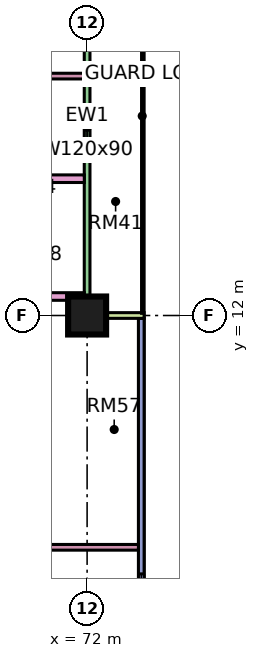
"""IFC4 building model, lengths in metres.
Left out: names, types, materials, properties, quantities, classifications, styles, units other than length and angle.
Written with IfcOpenShell. Run it as: python <this file> out.ifc"""

import sys

from ifc_helpers import new_model, si_unit, direction, frame, frame_2d, origin, origin_2d, place, context, subcontext, project, spatial, rectangle, extrude, element, fill, save


model = new_model("IFC4")
c1 = context("Model", 3, precision=1e-05, world=origin(), true_north=direction((0.0, 1.0)))
c2 = subcontext(c1, "Body", "Model", "MODEL_VIEW")
j1 = project(units=[si_unit("LENGTHUNIT", "METRE"), si_unit("PLANEANGLEUNIT", "RADIAN")], contexts=[c1])
p1 = place(None, origin())
s1 = spatial("IfcSite", under=j1, at=p1, CompositionType="ELEMENT")
p2 = place(p1, origin())
s2 = spatial("IfcBuilding", under=s1, at=p2, CompositionType="ELEMENT")
p3 = place(p2, frame((0.0, 0.0, 129.4)))
s3 = spatial("IfcBuildingStorey", under=s2, at=p3, CompositionType="ELEMENT", Elevation=129.4)
p4 = place(p3, frame((72.0, 12.0, 0.0), z_axis=(0.0, 0.0, 1.0), x_axis=(1.0, 0.0, 0.0)))
e1 = element("IfcColumn", 1, at=p4, inside=s3, PredefinedType="COLUMN", context=c2, shape_type="SweptSolid", body=[
    extrude(rectangle(XDim=1.0, YDim=1.0, at=origin_2d()), origin(), (0.0, 0.0, 1.0), 3.75),
])
p5 = place(p3, frame((73.425, 1.5, 0.0), z_axis=(0.0, 0.0, 1.0), x_axis=(0.0, 1.0, 0.0)))
e2 = element("IfcWall", 2, at=p5, inside=s3, PredefinedType="SOLIDWALL", context=c2, shape_type="SweptSolid", body=[
    extrude(rectangle(XDim=10.425, YDim=0.15, at=frame_2d((5.212, 0.0))), origin(), (0.0, 0.0, 1.0), 3.35),
])
p6 = place(p5, frame((0.7, 0.0, 0.45)))
e3 = element("IfcOpeningElement", 3, at=p6, cuts=e2, PredefinedType="OPENING", context=c2, shape_type="SweptSolid", body=[
    extrude(rectangle(XDim=3.0, YDim=2.4, at=frame_2d((1.5, 1.2))), frame((0.0, 0.085, 0.0), z_axis=(0.0, -1.0, 0.0), x_axis=(1.0, 0.0, 0.0)), (0.0, 0.0, 1.0), 0.17),
])
p7 = place(p3, frame((72.0, 12.075, 0.0), z_axis=(0.0, 0.0, 1.0), x_axis=(0.0, 1.0, 0.0)))
e4 = element("IfcWall", 4, at=p7, inside=s3, PredefinedType="SOLIDWALL", context=c2, shape_type="SweptSolid", body=[
    extrude(rectangle(XDim=10.35, YDim=0.15, at=frame_2d((5.175, 0.0))), origin(), (0.0, 0.0, 1.0), 3.35),
])
p8 = place(p7, frame((4.275, 0.0, 1.7)))
e5 = element("IfcOpeningElement", 5, at=p8, cuts=e4, PredefinedType="OPENING", context=c2, shape_type="SweptSolid", body=[
    extrude(rectangle(XDim=1.2, YDim=0.9, at=frame_2d((0.6, 0.45))), frame((0.0, 0.085, 0.0), z_axis=(0.0, -1.0, 0.0), x_axis=(1.0, 0.0, 0.0)), (0.0, 0.0, 1.0), 0.17),
])
p9 = place(p7, frame((7.988, 0.0, 0.45)))
e6 = element("IfcOpeningElement", 6, at=p9, cuts=e4, PredefinedType="OPENING", context=c2, shape_type="SweptSolid", body=[
    extrude(rectangle(XDim=1.8, YDim=2.4, at=frame_2d((0.9, 1.2))), frame((0.0, 0.085, 0.0), z_axis=(0.0, -1.0, 0.0), x_axis=(1.0, 0.0, 0.0)), (0.0, 0.0, 1.0), 0.17),
])
p10 = place(p3, frame((73.5, 12.0, 0.0), z_axis=(0.0, 0.0, 1.0), x_axis=(-1.0, 0.0, 0.0)))
e7 = element("IfcWall", 7, at=p10, inside=s3, PredefinedType="SOLIDWALL", context=c2, shape_type="SweptSolid", body=[
    extrude(rectangle(XDim=1.5, YDim=0.15, at=frame_2d((0.75, 0.0))), origin(), (0.0, 0.0, 1.0), 3.35),
])
p11 = place(p3, frame((40.65, 12.5, 0.0), z_axis=(0.0, 0.0, 1.0), x_axis=(1.0, 0.0, 0.0)))
e8 = element("IfcWall", 8, at=p11, inside=s3, PredefinedType="PARTITIONING", context=c2, shape_type="SweptSolid", body=[
    extrude(rectangle(XDim=31.276, YDim=0.2, at=frame_2d((15.638, 0.0))), origin(), (0.0, 0.0, 1.0), 3.35),
])
p12 = place(p11, frame((29.1, 0.0, 0.0)))
e9 = element("IfcOpeningElement", 9, at=p12, cuts=e8, PredefinedType="OPENING", context=c2, shape_type="SweptSolid", body=[
    extrude(rectangle(XDim=1.0, YDim=2.1, at=frame_2d((0.5, 1.05))), frame((0.0, 0.11, 0.0), z_axis=(0.0, -1.0, 0.0), x_axis=(1.0, 0.0, 0.0)), (0.0, 0.0, 1.0), 0.22),
])
p13 = place(p11, frame((1.05, 0.0, 0.0)))
e10 = element("IfcOpeningElement", 10, at=p13, cuts=e8, PredefinedType="OPENING", context=c2, shape_type="SweptSolid", body=[
    extrude(rectangle(XDim=1.0, YDim=2.1, at=frame_2d((0.5, 1.05))), frame((0.0, 0.11, 0.0), z_axis=(0.0, -1.0, 0.0), x_axis=(1.0, 0.0, 0.0)), (0.0, 0.0, 1.0), 0.22),
])
p14 = place(p3, frame((48.1, 5.9, 0.0), z_axis=(0.0, 0.0, 1.0), x_axis=(1.0, 0.0, 0.0)))
e11 = element("IfcWall", 11, at=p14, inside=s3, PredefinedType="PARTITIONING", context=c2, shape_type="SweptSolid", body=[
    extrude(rectangle(XDim=25.25, YDim=0.15, at=frame_2d((12.625, 0.0))), origin(), (0.0, 0.0, 1.0), 3.35),
])
p15 = place(p14, frame((6.95, 0.0, 0.0)))
e12 = element("IfcOpeningElement", 12, at=p15, cuts=e11, PredefinedType="OPENING", context=c2, shape_type="SweptSolid", body=[
    extrude(rectangle(XDim=0.9, YDim=2.1, at=frame_2d((0.45, 1.05))), frame((0.0, 0.085, 0.0), z_axis=(0.0, -1.0, 0.0), x_axis=(1.0, 0.0, 0.0)), (0.0, 0.0, 1.0), 0.17),
])
p16 = place(p14, frame((9.95, 0.0, 0.0)))
e13 = element("IfcOpeningElement", 13, at=p16, cuts=e11, PredefinedType="OPENING", context=c2, shape_type="SweptSolid", body=[
    extrude(rectangle(XDim=0.9, YDim=2.1, at=frame_2d((0.45, 1.05))), frame((0.0, 0.085, 0.0), z_axis=(0.0, -1.0, 0.0), x_axis=(1.0, 0.0, 0.0)), (0.0, 0.0, 1.0), 0.17),
])
p17 = place(p14, frame((15.95, 0.0, 0.0)))
e14 = element("IfcOpeningElement", 14, at=p17, cuts=e11, PredefinedType="OPENING", context=c2, shape_type="SweptSolid", body=[
    extrude(rectangle(XDim=0.9, YDim=2.1, at=frame_2d((0.45, 1.05))), frame((0.0, 0.085, 0.0), z_axis=(0.0, -1.0, 0.0), x_axis=(1.0, 0.0, 0.0)), (0.0, 0.0, 1.0), 0.17),
])
p18 = place(p14, frame((20.45, 0.0, 0.0)))
e15 = element("IfcOpeningElement", 15, at=p18, cuts=e11, PredefinedType="OPENING", context=c2, shape_type="SweptSolid", body=[
    extrude(rectangle(XDim=0.9, YDim=2.1, at=frame_2d((0.45, 1.05))), frame((0.0, 0.085, 0.0), z_axis=(0.0, -1.0, 0.0), x_axis=(1.0, 0.0, 0.0)), (0.0, 0.0, 1.0), 0.17),
])
p19 = place(p14, frame((1.8, 0.0, 0.0)))
e16 = element("IfcOpeningElement", 16, at=p19, cuts=e11, PredefinedType="OPENING", context=c2, shape_type="SweptSolid", body=[
    extrude(rectangle(XDim=0.8, YDim=2.1, at=frame_2d((0.4, 1.05))), frame((0.0, 0.085, 0.0), z_axis=(0.0, -1.0, 0.0), x_axis=(1.0, 0.0, 0.0)), (0.0, 0.0, 1.0), 0.17),
])
p20 = place(p14, frame((3.65, 0.0, 0.0)))
e17 = element("IfcOpeningElement", 17, at=p20, cuts=e11, PredefinedType="OPENING", context=c2, shape_type="SweptSolid", body=[
    extrude(rectangle(XDim=1.6, YDim=2.1, at=frame_2d((0.8, 1.05))), frame((0.0, 0.085, 0.0), z_axis=(0.0, -1.0, 0.0), x_axis=(1.0, 0.0, 0.0)), (0.0, 0.0, 1.0), 0.17),
])
p21 = place(p3, frame((51.225, 15.6, 0.0), z_axis=(0.0, 0.0, 1.0), x_axis=(1.0, 0.0, 0.0)))
e18 = element("IfcWall", 18, at=p21, inside=s3, PredefinedType="PARTITIONING", context=c2, shape_type="SweptSolid", body=[
    extrude(rectangle(XDim=20.701, YDim=0.2, at=frame_2d((10.351, 0.0))), origin(), (0.0, 0.0, 1.0), 3.35),
])
p22 = place(p21, frame((15.875, 0.0, 0.0)))
e19 = element("IfcOpeningElement", 19, at=p22, cuts=e18, PredefinedType="OPENING", context=c2, shape_type="SweptSolid", body=[
    extrude(rectangle(XDim=1.0, YDim=2.1, at=frame_2d((0.5, 1.05))), frame((0.0, 0.11, 0.0), z_axis=(0.0, -1.0, 0.0), x_axis=(1.0, 0.0, 0.0)), (0.0, 0.0, 1.0), 0.22),
])
p23 = place(p21, frame((0.875, 0.0, 0.0)))
e20 = element("IfcOpeningElement", 20, at=p23, cuts=e18, PredefinedType="OPENING", context=c2, shape_type="SweptSolid", body=[
    extrude(rectangle(XDim=1.0, YDim=2.1, at=frame_2d((0.5, 1.05))), frame((0.0, 0.11, 0.0), z_axis=(0.0, -1.0, 0.0), x_axis=(1.0, 0.0, 0.0)), (0.0, 0.0, 1.0), 0.22),
])
p24 = place(p3, frame((69.375, 18.3, 0.0), z_axis=(0.0, 0.0, 1.0), x_axis=(1.0, 0.0, 0.0)))
e21 = element("IfcWall", 21, at=p24, inside=s3, PredefinedType="PARTITIONING", context=c2, shape_type="SweptSolid", body=[
    extrude(rectangle(XDim=2.551, YDim=0.15, at=frame_2d((1.275, 0.0))), origin(), (0.0, 0.0, 1.0), 3.35),
])
p25 = place(p6, origin())
e22 = element("IfcWindow", 22, at=p25, inside=s3, PartitioningType="SINGLE_PANEL", PredefinedType="WINDOW", context=c2, shape_type="SweptSolid", body=[
    extrude(rectangle(XDim=3.0, YDim=2.4, at=frame_2d((1.5, 1.2))), frame((0.0, 0.03, 0.0), z_axis=(0.0, -1.0, 0.0), x_axis=(1.0, 0.0, 0.0)), (0.0, 0.0, 1.0), 0.06),
])
fill(e3, e22)
p26 = place(p8, origin())
e23 = element("IfcWindow", 23, at=p26, inside=s3, PartitioningType="SINGLE_PANEL", PredefinedType="WINDOW", context=c2, shape_type="SweptSolid", body=[
    extrude(rectangle(XDim=1.2, YDim=0.9, at=frame_2d((0.6, 0.45))), frame((0.0, 0.03, 0.0), z_axis=(0.0, -1.0, 0.0), x_axis=(1.0, 0.0, 0.0)), (0.0, 0.0, 1.0), 0.06),
])
fill(e5, e23)
save(model, sys.argv[1])
